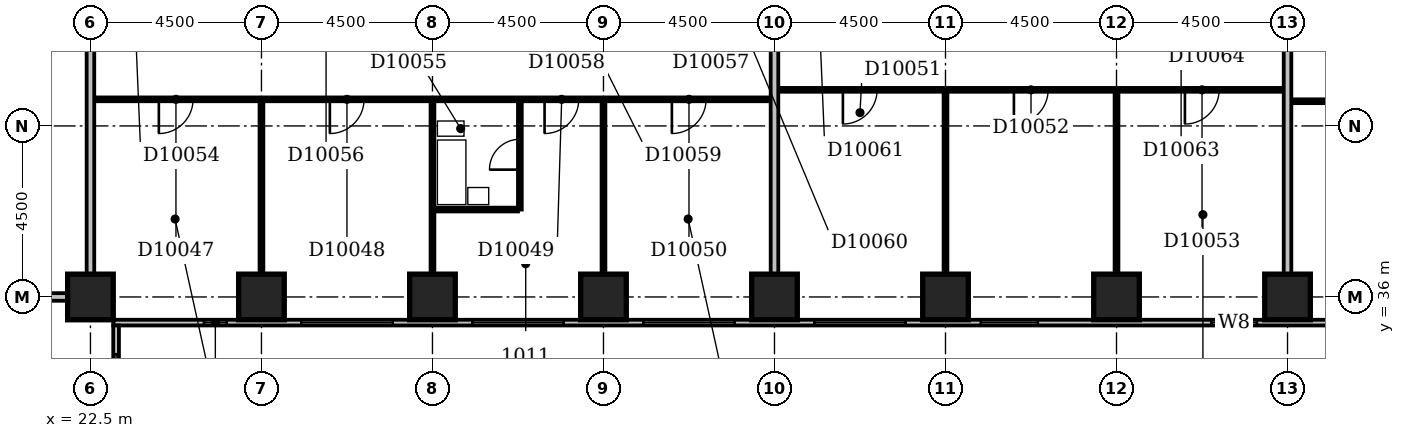
"""IFC4 building model, lengths in metres.
Left out: names, types, materials, properties, quantities, classifications, styles, units other than length and angle.
Written with IfcOpenShell. Run it as: python <this file> out.ifc"""

import sys

from ifc_helpers import new_model, si_unit, direction, frame, frame_2d, origin, origin_2d, place, context, subcontext, project, spatial, rectangle, extrude, element, fill, save


model = new_model("IFC4")
c1 = context("Model", 3, precision=1e-05, world=origin(), true_north=direction((0.0, 1.0)))
c2 = subcontext(c1, "Body", "Model", "MODEL_VIEW")
j1 = project(units=[si_unit("LENGTHUNIT", "METRE"), si_unit("PLANEANGLEUNIT", "RADIAN")], contexts=[c1])
p1 = place(None, origin())
s1 = spatial("IfcSite", under=j1, at=p1, CompositionType="ELEMENT")
p2 = place(p1, origin())
s2 = spatial("IfcBuilding", under=s1, at=p2, CompositionType="ELEMENT")
p3 = place(p2, frame((0.0, 0.0, 47.0)))
s3 = spatial("IfcBuildingStorey", under=s2, at=p3, CompositionType="ELEMENT", Elevation=47.0)
for number, where, z_axis, x_axis in (
    (1, (22.5, 36.0, -0.3), (0.0, 0.0, 1.0), (1.0, 0.0, 0.0)),
    (2, (27.0, 36.0, -0.3), (0.0, 0.0, 1.0), (1.0, 0.0, 0.0)),
    (3, (31.5, 36.0, -0.3), (0.0, 0.0, 1.0), (1.0, 0.0, 0.0)),
    (4, (36.0, 36.0, -0.3), (0.0, 0.0, 1.0), (1.0, 0.0, 0.0)),
    (5, (40.5, 36.0, -0.3), (0.0, 0.0, 1.0), (1.0, 0.0, 0.0)),
    (6, (45.0, 36.0, -0.3), (0.0, 0.0, 1.0), (1.0, 0.0, 0.0)),
    (7, (49.5, 36.0, -0.3), (0.0, 0.0, 1.0), (1.0, 0.0, 0.0)),
    (8, (54.0, 36.0, -0.3), (0.0, 0.0, 1.0), (1.0, 0.0, 0.0)),
):
    element("IfcColumn", number, at=place(p3, frame(where, z_axis=z_axis, x_axis=x_axis)), inside=s3, PredefinedType="COLUMN", context=c2, shape_type="SweptSolid", body=[
        extrude(rectangle(XDim=1.2, YDim=1.2, at=origin_2d()), origin(), (0.0, 0.0, 1.0), 3.6),
    ])
p4 = place(p3, frame((23.175, 17.4, 0.0), z_axis=(0.0, 0.0, 1.0), x_axis=(0.0, 1.0, 0.0)))
e9 = element("IfcWall", 9, at=p4, inside=s3, PredefinedType="STANDARD", context=c2, shape_type="SweptSolid", body=[
    extrude(rectangle(XDim=17.85, YDim=0.15, at=frame_2d((8.925, 0.0))), origin(), (0.0, 0.0, 1.0), 2.7),
])
p5 = place(p4, frame((3.03, 0.0, 0.6)))
e10 = element("IfcOpeningElement", 10, at=p5, cuts=e9, PredefinedType="OPENING", context=c2, shape_type="SweptSolid", body=[
    extrude(rectangle(XDim=1.2, YDim=1.8, at=frame_2d((0.6, 0.9))), frame((0.0, 0.087, 0.0), z_axis=(0.0, -1.0, 0.0), x_axis=(1.0, 0.0, 0.0)), (0.0, 0.0, 1.0), 0.174),
])
p6 = place(p4, frame((6.15, 0.0, 0.6)))
e11 = element("IfcOpeningElement", 11, at=p6, cuts=e9, PredefinedType="OPENING", context=c2, shape_type="SweptSolid", body=[
    extrude(rectangle(XDim=2.4, YDim=1.8, at=frame_2d((1.2, 0.9))), frame((0.0, 0.087, 0.0), z_axis=(0.0, -1.0, 0.0), x_axis=(1.0, 0.0, 0.0)), (0.0, 0.0, 1.0), 0.174),
])
p7 = place(p4, frame((10.65, 0.0, 0.6)))
e12 = element("IfcOpeningElement", 12, at=p7, cuts=e9, PredefinedType="OPENING", context=c2, shape_type="SweptSolid", body=[
    extrude(rectangle(XDim=2.4, YDim=1.8, at=frame_2d((1.2, 0.9))), frame((0.0, 0.087, 0.0), z_axis=(0.0, -1.0, 0.0), x_axis=(1.0, 0.0, 0.0)), (0.0, 0.0, 1.0), 0.174),
])
p8 = place(p4, frame((14.992, 0.0, 0.6)))
e13 = element("IfcOpeningElement", 13, at=p8, cuts=e9, PredefinedType="OPENING", context=c2, shape_type="SweptSolid", body=[
    extrude(rectangle(XDim=2.1, YDim=1.8, at=frame_2d((1.05, 0.9))), frame((0.0, 0.087, 0.0), z_axis=(0.0, -1.0, 0.0), x_axis=(1.0, 0.0, 0.0)), (0.0, 0.0, 1.0), 0.174),
])
p9 = place(p3, frame((23.1, 35.325, 0.0), z_axis=(0.0, 0.0, 1.0), x_axis=(1.0, 0.0, 0.0)))
e14 = element("IfcWall", 14, at=p9, inside=s3, PredefinedType="STANDARD", context=c2, shape_type="SweptSolid", body=[
    extrude(rectangle(XDim=45.15, YDim=0.15, at=frame_2d((22.575, 0.0))), origin(), (0.0, 0.0, 1.0), 2.7),
])
p10 = place(p9, frame((2.386, 0.0, 0.6)))
e15 = element("IfcOpeningElement", 15, at=p10, cuts=e14, PredefinedType="OPENING", context=c2, shape_type="SweptSolid", body=[
    extrude(rectangle(XDim=0.6, YDim=1.8, at=frame_2d((0.3, 0.9))), frame((0.0, 0.087, 0.0), z_axis=(0.0, -1.0, 0.0), x_axis=(1.0, 0.0, 0.0)), (0.0, 0.0, 1.0), 0.174),
])
p11 = place(p9, frame((4.95, 0.0, 0.6)))
e16 = element("IfcOpeningElement", 16, at=p11, cuts=e14, PredefinedType="OPENING", context=c2, shape_type="SweptSolid", body=[
    extrude(rectangle(XDim=2.4, YDim=1.8, at=frame_2d((1.2, 0.9))), frame((0.0, 0.087, 0.0), z_axis=(0.0, -1.0, 0.0), x_axis=(1.0, 0.0, 0.0)), (0.0, 0.0, 1.0), 0.174),
])
p12 = place(p9, frame((9.45, 0.0, 0.6)))
e17 = element("IfcOpeningElement", 17, at=p12, cuts=e14, PredefinedType="OPENING", context=c2, shape_type="SweptSolid", body=[
    extrude(rectangle(XDim=2.4, YDim=1.8, at=frame_2d((1.2, 0.9))), frame((0.0, 0.087, 0.0), z_axis=(0.0, -1.0, 0.0), x_axis=(1.0, 0.0, 0.0)), (0.0, 0.0, 1.0), 0.174),
])
p13 = place(p9, frame((13.95, 0.0, 0.6)))
e18 = element("IfcOpeningElement", 18, at=p13, cuts=e14, PredefinedType="OPENING", context=c2, shape_type="SweptSolid", body=[
    extrude(rectangle(XDim=2.4, YDim=1.8, at=frame_2d((1.2, 0.9))), frame((0.0, 0.087, 0.0), z_axis=(0.0, -1.0, 0.0), x_axis=(1.0, 0.0, 0.0)), (0.0, 0.0, 1.0), 0.174),
])
p14 = place(p9, frame((18.45, 0.0, 0.6)))
e19 = element("IfcOpeningElement", 19, at=p14, cuts=e14, PredefinedType="OPENING", context=c2, shape_type="SweptSolid", body=[
    extrude(rectangle(XDim=2.4, YDim=1.8, at=frame_2d((1.2, 0.9))), frame((0.0, 0.087, 0.0), z_axis=(0.0, -1.0, 0.0), x_axis=(1.0, 0.0, 0.0)), (0.0, 0.0, 1.0), 0.174),
])
p15 = place(p9, frame((22.83, 0.0, 0.6)))
e20 = element("IfcOpeningElement", 20, at=p15, cuts=e14, PredefinedType="OPENING", context=c2, shape_type="SweptSolid", body=[
    extrude(rectangle(XDim=1.5, YDim=1.8, at=frame_2d((0.75, 0.9))), frame((0.0, 0.087, 0.0), z_axis=(0.0, -1.0, 0.0), x_axis=(1.0, 0.0, 0.0)), (0.0, 0.0, 1.0), 0.174),
])
p16 = place(p9, frame((28.894, 0.0, 0.6)))
e21 = element("IfcOpeningElement", 21, at=p16, cuts=e14, PredefinedType="OPENING", context=c2, shape_type="SweptSolid", body=[
    extrude(rectangle(XDim=1.2, YDim=1.8, at=frame_2d((0.6, 0.9))), frame((0.0, 0.087, 0.0), z_axis=(0.0, -1.0, 0.0), x_axis=(1.0, 0.0, 0.0)), (0.0, 0.0, 1.0), 0.174),
])
p17 = place(p9, frame((31.95, 0.0, 0.6)))
e22 = element("IfcOpeningElement", 22, at=p17, cuts=e14, PredefinedType="OPENING", context=c2, shape_type="SweptSolid", body=[
    extrude(rectangle(XDim=2.4, YDim=1.8, at=frame_2d((1.2, 0.9))), frame((0.0, 0.087, 0.0), z_axis=(0.0, -1.0, 0.0), x_axis=(1.0, 0.0, 0.0)), (0.0, 0.0, 1.0), 0.174),
])
p18 = place(p9, frame((36.45, 0.0, 0.6)))
e23 = element("IfcOpeningElement", 23, at=p18, cuts=e14, PredefinedType="OPENING", context=c2, shape_type="SweptSolid", body=[
    extrude(rectangle(XDim=2.4, YDim=1.8, at=frame_2d((1.2, 0.9))), frame((0.0, 0.087, 0.0), z_axis=(0.0, -1.0, 0.0), x_axis=(1.0, 0.0, 0.0)), (0.0, 0.0, 1.0), 0.174),
])
p19 = place(p9, frame((40.95, 0.0, 0.6)))
e24 = element("IfcOpeningElement", 24, at=p19, cuts=e14, PredefinedType="OPENING", context=c2, shape_type="SweptSolid", body=[
    extrude(rectangle(XDim=2.4, YDim=1.8, at=frame_2d((1.2, 0.9))), frame((0.0, 0.087, 0.0), z_axis=(0.0, -1.0, 0.0), x_axis=(1.0, 0.0, 0.0)), (0.0, 0.0, 1.0), 0.174),
])
p20 = place(p3, frame((9.1, 36.0, 0.0), z_axis=(0.0, 0.0, 1.0), x_axis=(1.0, 0.0, 0.0)))
e25 = element("IfcWall", 25, at=p20, inside=s3, PredefinedType="PARTITIONING", context=c2, shape_type="SweptSolid", body=[
    extrude(rectangle(XDim=12.8, YDim=0.2, at=frame_2d((6.4, 0.0))), origin(), (0.0, 0.0, 1.0), 2.4),
])
p21 = place(p3, frame((22.5, 36.6, 0.0), z_axis=(0.0, 0.0, 1.0), x_axis=(0.0, 1.0, 0.0)))
e26 = element("IfcWall", 26, at=p21, inside=s3, PredefinedType="PARTITIONING", context=c2, shape_type="SweptSolid", body=[
    extrude(rectangle(XDim=12.8, YDim=0.2, at=frame_2d((6.4, 0.0))), origin(), (0.0, 0.0, 1.0), 3.3),
])
p22 = place(p3, frame((27.0, 36.6, 0.0), z_axis=(0.0, 0.0, 1.0), x_axis=(0.0, 1.0, 0.0)))
e27 = element("IfcWall", 27, at=p22, inside=s3, PredefinedType="PARTITIONING", context=c2, shape_type="SweptSolid", body=[
    extrude(rectangle(XDim=4.55, YDim=0.1, at=frame_2d((2.275, 0.0))), origin(), (0.0, 0.0, 1.0), 2.6),
])
p23 = place(p3, frame((31.5, 36.6, 0.0), z_axis=(0.0, 0.0, 1.0), x_axis=(0.0, 1.0, 0.0)))
e28 = element("IfcWall", 28, at=p23, inside=s3, PredefinedType="PARTITIONING", context=c2, shape_type="SweptSolid", body=[
    extrude(rectangle(XDim=4.55, YDim=0.1, at=frame_2d((2.275, 0.0))), origin(), (0.0, 0.0, 1.0), 3.3),
])
p24 = place(p3, frame((36.0, 36.6, 0.0), z_axis=(0.0, 0.0, 1.0), x_axis=(0.0, 1.0, 0.0)))
e29 = element("IfcWall", 29, at=p24, inside=s3, PredefinedType="PARTITIONING", context=c2, shape_type="SweptSolid", body=[
    extrude(rectangle(XDim=4.55, YDim=0.1, at=frame_2d((2.275, 0.0))), origin(), (0.0, 0.0, 1.0), 2.4),
])
p25 = place(p3, frame((40.5, 36.6, 0.0), z_axis=(0.0, 0.0, 1.0), x_axis=(0.0, 1.0, 0.0)))
e30 = element("IfcWall", 30, at=p25, inside=s3, PredefinedType="PARTITIONING", context=c2, shape_type="SweptSolid", body=[
    extrude(rectangle(XDim=12.8, YDim=0.2, at=frame_2d((6.4, 0.0))), origin(), (0.0, 0.0, 1.0), 3.3),
])
p26 = place(p3, frame((45.0, 36.6, 0.0), z_axis=(0.0, 0.0, 1.0), x_axis=(0.0, 1.0, 0.0)))
e31 = element("IfcWall", 31, at=p26, inside=s3, PredefinedType="PARTITIONING", context=c2, shape_type="SweptSolid", body=[
    extrude(rectangle(XDim=4.8, YDim=0.1, at=frame_2d((2.4, 0.0))), origin(), (0.0, 0.0, 1.0), 2.6),
])
p27 = place(p3, frame((49.5, 36.6, 0.0), z_axis=(0.0, 0.0, 1.0), x_axis=(0.0, 1.0, 0.0)))
e32 = element("IfcWall", 32, at=p27, inside=s3, PredefinedType="PARTITIONING", context=c2, shape_type="SweptSolid", body=[
    extrude(rectangle(XDim=4.8, YDim=0.1, at=frame_2d((2.4, 0.0))), origin(), (0.0, 0.0, 1.0), 3.3),
])
p28 = place(p3, frame((54.0, 36.6, 0.0), z_axis=(0.0, 0.0, 1.0), x_axis=(0.0, 1.0, 0.0)))
e33 = element("IfcWall", 33, at=p28, inside=s3, PredefinedType="PARTITIONING", context=c2, shape_type="SweptSolid", body=[
    extrude(rectangle(XDim=12.8, YDim=0.2, at=frame_2d((6.4, 0.0))), origin(), (0.0, 0.0, 1.0), 2.6),
])
p29 = place(p3, frame((31.55, 38.3, 0.0), z_axis=(0.0, 0.0, 1.0), x_axis=(1.0, 0.0, 0.0)))
e34 = element("IfcWall", 34, at=p29, inside=s3, PredefinedType="PLUMBINGWALL", context=c2, shape_type="SweptSolid", body=[
    extrude(rectangle(XDim=2.2, YDim=0.1, at=frame_2d((1.1, 0.0))), origin(), (0.0, 0.0, 1.0), 3.3),
])
p30 = place(p3, frame((33.8, 38.3, 0.0), z_axis=(0.0, 0.0, 1.0), x_axis=(0.0, 1.0, 0.0)))
e35 = element("IfcWall", 35, at=p30, inside=s3, PredefinedType="PLUMBINGWALL", context=c2, shape_type="SweptSolid", body=[
    extrude(rectangle(XDim=2.85, YDim=0.1, at=frame_2d((1.425, 0.0))), origin(), (0.0, 0.0, 1.0), 3.3),
])
p31 = place(p30, frame((1.05, 0.0, 0.0)))
e36 = element("IfcOpeningElement", 36, at=p31, cuts=e35, PredefinedType="OPENING", context=c2, shape_type="SweptSolid", body=[
    extrude(rectangle(XDim=0.8, YDim=2.1, at=frame_2d((0.4, 1.05))), frame((0.0, 0.062, 0.0), z_axis=(0.0, -1.0, 0.0), x_axis=(1.0, 0.0, 0.0)), (0.0, 0.0, 1.0), 0.124),
])
p32 = place(p3, frame((54.1, 41.15, 0.0), z_axis=(0.0, 0.0, 1.0), x_axis=(1.0, 0.0, 0.0)))
e37 = element("IfcWall", 37, at=p32, inside=s3, PredefinedType="PARTITIONING", context=c2, shape_type="SweptSolid", body=[
    extrude(rectangle(XDim=14.0, YDim=0.1, at=frame_2d((7.0, 0.0))), origin(), (0.0, 0.0, 1.0), 3.3),
])
p33 = place(p32, frame((1.7, 0.0, 0.0)))
e38 = element("IfcOpeningElement", 38, at=p33, cuts=e37, PredefinedType="OPENING", context=c2, shape_type="SweptSolid", body=[
    extrude(rectangle(XDim=0.9, YDim=2.1, at=frame_2d((0.45, 1.05))), frame((0.0, 0.062, 0.0), z_axis=(0.0, -1.0, 0.0), x_axis=(1.0, 0.0, 0.0)), (0.0, 0.0, 1.0), 0.124),
])
p34 = place(p32, frame((6.2, 0.0, 0.0)))
e39 = element("IfcOpeningElement", 39, at=p34, cuts=e37, PredefinedType="OPENING", context=c2, shape_type="SweptSolid", body=[
    extrude(rectangle(XDim=0.9, YDim=2.1, at=frame_2d((0.45, 1.05))), frame((0.0, 0.062, 0.0), z_axis=(0.0, -1.0, 0.0), x_axis=(1.0, 0.0, 0.0)), (0.0, 0.0, 1.0), 0.124),
])
p35 = place(p32, frame((10.7, 0.0, 0.0)))
e40 = element("IfcOpeningElement", 40, at=p35, cuts=e37, PredefinedType="OPENING", context=c2, shape_type="SweptSolid", body=[
    extrude(rectangle(XDim=0.9, YDim=2.1, at=frame_2d((0.45, 1.05))), frame((0.0, 0.062, 0.0), z_axis=(0.0, -1.0, 0.0), x_axis=(1.0, 0.0, 0.0)), (0.0, 0.0, 1.0), 0.124),
])
p36 = place(p3, frame((22.6, 41.2, 0.0), z_axis=(0.0, 0.0, 1.0), x_axis=(1.0, 0.0, 0.0)))
e41 = element("IfcWall", 41, at=p36, inside=s3, PredefinedType="PARTITIONING", context=c2, shape_type="SweptSolid", body=[
    extrude(rectangle(XDim=17.8, YDim=0.1, at=frame_2d((8.9, 0.0))), origin(), (0.0, 0.0, 1.0), 3.3),
])
p37 = place(p36, frame((1.7, 0.0, 0.0)))
e42 = element("IfcOpeningElement", 42, at=p37, cuts=e41, PredefinedType="OPENING", context=c2, shape_type="SweptSolid", body=[
    extrude(rectangle(XDim=0.9, YDim=2.1, at=frame_2d((0.45, 1.05))), frame((0.0, 0.062, 0.0), z_axis=(0.0, -1.0, 0.0), x_axis=(1.0, 0.0, 0.0)), (0.0, 0.0, 1.0), 0.124),
])
p38 = place(p36, frame((6.2, 0.0, 0.0)))
e43 = element("IfcOpeningElement", 43, at=p38, cuts=e41, PredefinedType="OPENING", context=c2, shape_type="SweptSolid", body=[
    extrude(rectangle(XDim=0.9, YDim=2.1, at=frame_2d((0.45, 1.05))), frame((0.0, 0.062, 0.0), z_axis=(0.0, -1.0, 0.0), x_axis=(1.0, 0.0, 0.0)), (0.0, 0.0, 1.0), 0.124),
])
p39 = place(p36, frame((11.85, 0.0, 0.0)))
e44 = element("IfcOpeningElement", 44, at=p39, cuts=e41, PredefinedType="OPENING", context=c2, shape_type="SweptSolid", body=[
    extrude(rectangle(XDim=0.9, YDim=2.1, at=frame_2d((0.45, 1.05))), frame((0.0, 0.062, 0.0), z_axis=(0.0, -1.0, 0.0), x_axis=(1.0, 0.0, 0.0)), (0.0, 0.0, 1.0), 0.124),
])
p40 = place(p36, frame((15.2, 0.0, 0.0)))
e45 = element("IfcOpeningElement", 45, at=p40, cuts=e41, PredefinedType="OPENING", context=c2, shape_type="SweptSolid", body=[
    extrude(rectangle(XDim=0.9, YDim=2.1, at=frame_2d((0.45, 1.05))), frame((0.0, 0.062, 0.0), z_axis=(0.0, -1.0, 0.0), x_axis=(1.0, 0.0, 0.0)), (0.0, 0.0, 1.0), 0.124),
])
p41 = place(p3, frame((40.6, 41.45, 0.0), z_axis=(0.0, 0.0, 1.0), x_axis=(1.0, 0.0, 0.0)))
e46 = element("IfcWall", 46, at=p41, inside=s3, PredefinedType="PARTITIONING", context=c2, shape_type="SweptSolid", body=[
    extrude(rectangle(XDim=13.3, YDim=0.1, at=frame_2d((6.65, 0.0))), origin(), (0.0, 0.0, 1.0), 3.3),
])
p42 = place(p41, frame((1.7, 0.0, 0.0)))
e47 = element("IfcOpeningElement", 47, at=p42, cuts=e46, PredefinedType="OPENING", context=c2, shape_type="SweptSolid", body=[
    extrude(rectangle(XDim=0.9, YDim=2.1, at=frame_2d((0.45, 1.05))), frame((0.0, 0.062, 0.0), z_axis=(0.0, -1.0, 0.0), x_axis=(1.0, 0.0, 0.0)), (0.0, 0.0, 1.0), 0.124),
])
p43 = place(p41, frame((6.2, 0.0, 0.0)))
e48 = element("IfcOpeningElement", 48, at=p43, cuts=e46, PredefinedType="OPENING", context=c2, shape_type="SweptSolid", body=[
    extrude(rectangle(XDim=0.9, YDim=2.1, at=frame_2d((0.45, 1.05))), frame((0.0, 0.062, 0.0), z_axis=(0.0, -1.0, 0.0), x_axis=(1.0, 0.0, 0.0)), (0.0, 0.0, 1.0), 0.124),
])
p44 = place(p41, frame((10.7, 0.0, 0.0)))
e49 = element("IfcOpeningElement", 49, at=p44, cuts=e46, PredefinedType="OPENING", context=c2, shape_type="SweptSolid", body=[
    extrude(rectangle(XDim=0.9, YDim=2.1, at=frame_2d((0.45, 1.05))), frame((0.0, 0.062, 0.0), z_axis=(0.0, -1.0, 0.0), x_axis=(1.0, 0.0, 0.0)), (0.0, 0.0, 1.0), 0.124),
])
p45 = place(p8, origin())
e50 = element("IfcWindow", 50, at=p45, inside=s3, PartitioningType="SINGLE_PANEL", PredefinedType="WINDOW", context=c2, shape_type="SweptSolid", body=[
    extrude(rectangle(XDim=2.1, YDim=1.8, at=frame_2d((1.05, 0.9))), frame((0.0, 0.03, 0.0), z_axis=(0.0, -1.0, 0.0), x_axis=(1.0, 0.0, 0.0)), (0.0, 0.0, 1.0), 0.06),
])
fill(e13, e50)
p46 = place(p10, origin())
e51 = element("IfcWindow", 51, at=p46, inside=s3, PartitioningType="SINGLE_PANEL", PredefinedType="WINDOW", context=c2, shape_type="SweptSolid", body=[
    extrude(rectangle(XDim=0.6, YDim=1.8, at=frame_2d((0.3, 0.9))), frame((0.0, 0.03, 0.0), z_axis=(0.0, -1.0, 0.0), x_axis=(1.0, 0.0, 0.0)), (0.0, 0.0, 1.0), 0.06),
])
fill(e15, e51)
p47 = place(p11, origin())
e52 = element("IfcWindow", 52, at=p47, inside=s3, PartitioningType="SINGLE_PANEL", PredefinedType="WINDOW", context=c2, shape_type="SweptSolid", body=[
    extrude(rectangle(XDim=2.4, YDim=1.8, at=frame_2d((1.2, 0.9))), frame((0.0, 0.03, 0.0), z_axis=(0.0, -1.0, 0.0), x_axis=(1.0, 0.0, 0.0)), (0.0, 0.0, 1.0), 0.06),
])
fill(e16, e52)
p48 = place(p12, origin())
e53 = element("IfcWindow", 53, at=p48, inside=s3, PartitioningType="SINGLE_PANEL", PredefinedType="WINDOW", context=c2, shape_type="SweptSolid", body=[
    extrude(rectangle(XDim=2.4, YDim=1.8, at=frame_2d((1.2, 0.9))), frame((0.0, 0.03, 0.0), z_axis=(0.0, -1.0, 0.0), x_axis=(1.0, 0.0, 0.0)), (0.0, 0.0, 1.0), 0.06),
])
fill(e17, e53)
p49 = place(p13, origin())
e54 = element("IfcWindow", 54, at=p49, inside=s3, PartitioningType="SINGLE_PANEL", PredefinedType="WINDOW", context=c2, shape_type="SweptSolid", body=[
    extrude(rectangle(XDim=2.4, YDim=1.8, at=frame_2d((1.2, 0.9))), frame((0.0, 0.03, 0.0), z_axis=(0.0, -1.0, 0.0), x_axis=(1.0, 0.0, 0.0)), (0.0, 0.0, 1.0), 0.06),
])
fill(e18, e54)
p50 = place(p14, origin())
e55 = element("IfcWindow", 55, at=p50, inside=s3, PartitioningType="SINGLE_PANEL", PredefinedType="WINDOW", context=c2, shape_type="SweptSolid", body=[
    extrude(rectangle(XDim=2.4, YDim=1.8, at=frame_2d((1.2, 0.9))), frame((0.0, 0.03, 0.0), z_axis=(0.0, -1.0, 0.0), x_axis=(1.0, 0.0, 0.0)), (0.0, 0.0, 1.0), 0.06),
])
fill(e19, e55)
p51 = place(p15, origin())
e56 = element("IfcWindow", 56, at=p51, inside=s3, PartitioningType="SINGLE_PANEL", PredefinedType="WINDOW", context=c2, shape_type="SweptSolid", body=[
    extrude(rectangle(XDim=1.5, YDim=1.8, at=frame_2d((0.75, 0.9))), frame((0.0, 0.03, 0.0), z_axis=(0.0, -1.0, 0.0), x_axis=(1.0, 0.0, 0.0)), (0.0, 0.0, 1.0), 0.06),
])
fill(e20, e56)
p52 = place(p16, origin())
e57 = element("IfcWindow", 57, at=p52, inside=s3, PartitioningType="SINGLE_PANEL", PredefinedType="WINDOW", context=c2, shape_type="SweptSolid", body=[
    extrude(rectangle(XDim=1.2, YDim=1.8, at=frame_2d((0.6, 0.9))), frame((0.0, 0.03, 0.0), z_axis=(0.0, -1.0, 0.0), x_axis=(1.0, 0.0, 0.0)), (0.0, 0.0, 1.0), 0.06),
])
fill(e21, e57)
p53 = place(p31, origin())
e58 = element("IfcDoor", 58, at=p53, inside=s3, OperationType="SINGLE_SWING_LEFT", PredefinedType="DOOR", context=c2, shape_type="SweptSolid", body=[
    extrude(rectangle(XDim=0.8, YDim=2.1, at=frame_2d((0.4, 1.05))), frame((0.0, 0.025, 0.0), z_axis=(0.0, -1.0, 0.0), x_axis=(1.0, 0.0, 0.0)), (0.0, 0.0, 1.0), 0.05),
])
fill(e36, e58)
p54 = place(p37, frame((0.9, 0.0, 0.0), z_axis=(0.0, 0.0, 1.0), x_axis=(-1.0, 0.0, 0.0)))
e59 = element("IfcDoor", 59, at=p54, inside=s3, OperationType="SINGLE_SWING_RIGHT", PredefinedType="DOOR", context=c2, shape_type="SweptSolid", body=[
    extrude(rectangle(XDim=0.9, YDim=2.1, at=frame_2d((0.45, 1.05))), frame((0.0, 0.025, 0.0), z_axis=(0.0, -1.0, 0.0), x_axis=(1.0, 0.0, 0.0)), (0.0, 0.0, 1.0), 0.05),
])
fill(e42, e59)
p55 = place(p38, frame((0.9, 0.0, 0.0), z_axis=(0.0, 0.0, 1.0), x_axis=(-1.0, 0.0, 0.0)))
e60 = element("IfcDoor", 60, at=p55, inside=s3, OperationType="SINGLE_SWING_RIGHT", PredefinedType="DOOR", context=c2, shape_type="SweptSolid", body=[
    extrude(rectangle(XDim=0.9, YDim=2.1, at=frame_2d((0.45, 1.05))), frame((0.0, 0.025, 0.0), z_axis=(0.0, -1.0, 0.0), x_axis=(1.0, 0.0, 0.0)), (0.0, 0.0, 1.0), 0.05),
])
fill(e43, e60)
p56 = place(p39, frame((0.9, 0.0, 0.0), z_axis=(0.0, 0.0, 1.0), x_axis=(-1.0, 0.0, 0.0)))
e61 = element("IfcDoor", 61, at=p56, inside=s3, OperationType="SINGLE_SWING_RIGHT", PredefinedType="DOOR", context=c2, shape_type="SweptSolid", body=[
    extrude(rectangle(XDim=0.9, YDim=2.1, at=frame_2d((0.45, 1.05))), frame((0.0, 0.025, 0.0), z_axis=(0.0, -1.0, 0.0), x_axis=(1.0, 0.0, 0.0)), (0.0, 0.0, 1.0), 0.05),
])
fill(e44, e61)
p57 = place(p40, frame((0.9, 0.0, 0.0), z_axis=(0.0, 0.0, 1.0), x_axis=(-1.0, 0.0, 0.0)))
e62 = element("IfcDoor", 62, at=p57, inside=s3, OperationType="SINGLE_SWING_RIGHT", PredefinedType="DOOR", context=c2, shape_type="SweptSolid", body=[
    extrude(rectangle(XDim=0.9, YDim=2.1, at=frame_2d((0.45, 1.05))), frame((0.0, 0.025, 0.0), z_axis=(0.0, -1.0, 0.0), x_axis=(1.0, 0.0, 0.0)), (0.0, 0.0, 1.0), 0.05),
])
fill(e45, e62)
p58 = place(p42, frame((0.9, 0.0, 0.0), z_axis=(0.0, 0.0, 1.0), x_axis=(-1.0, 0.0, 0.0)))
e63 = element("IfcDoor", 63, at=p58, inside=s3, OperationType="SINGLE_SWING_RIGHT", PredefinedType="DOOR", context=c2, shape_type="SweptSolid", body=[
    extrude(rectangle(XDim=0.9, YDim=2.1, at=frame_2d((0.45, 1.05))), frame((0.0, 0.025, 0.0), z_axis=(0.0, -1.0, 0.0), x_axis=(1.0, 0.0, 0.0)), (0.0, 0.0, 1.0), 0.05),
])
fill(e47, e63)
p59 = place(p43, frame((0.9, 0.0, 0.0), z_axis=(0.0, 0.0, 1.0), x_axis=(-1.0, 0.0, 0.0)))
e64 = element("IfcDoor", 64, at=p59, inside=s3, OperationType="SINGLE_SWING_RIGHT", PredefinedType="DOOR", context=c2, shape_type="SweptSolid", body=[
    extrude(rectangle(XDim=0.9, YDim=2.1, at=frame_2d((0.45, 1.05))), frame((0.0, 0.025, 0.0), z_axis=(0.0, -1.0, 0.0), x_axis=(1.0, 0.0, 0.0)), (0.0, 0.0, 1.0), 0.05),
])
fill(e48, e64)
p60 = place(p44, frame((0.9, 0.0, 0.0), z_axis=(0.0, 0.0, 1.0), x_axis=(-1.0, 0.0, 0.0)))
e65 = element("IfcDoor", 65, at=p60, inside=s3, OperationType="SINGLE_SWING_RIGHT", PredefinedType="DOOR", context=c2, shape_type="SweptSolid", body=[
    extrude(rectangle(XDim=0.9, YDim=2.1, at=frame_2d((0.45, 1.05))), frame((0.0, 0.025, 0.0), z_axis=(0.0, -1.0, 0.0), x_axis=(1.0, 0.0, 0.0)), (0.0, 0.0, 1.0), 0.05),
])
fill(e49, e65)
save(model, sys.argv[1])
